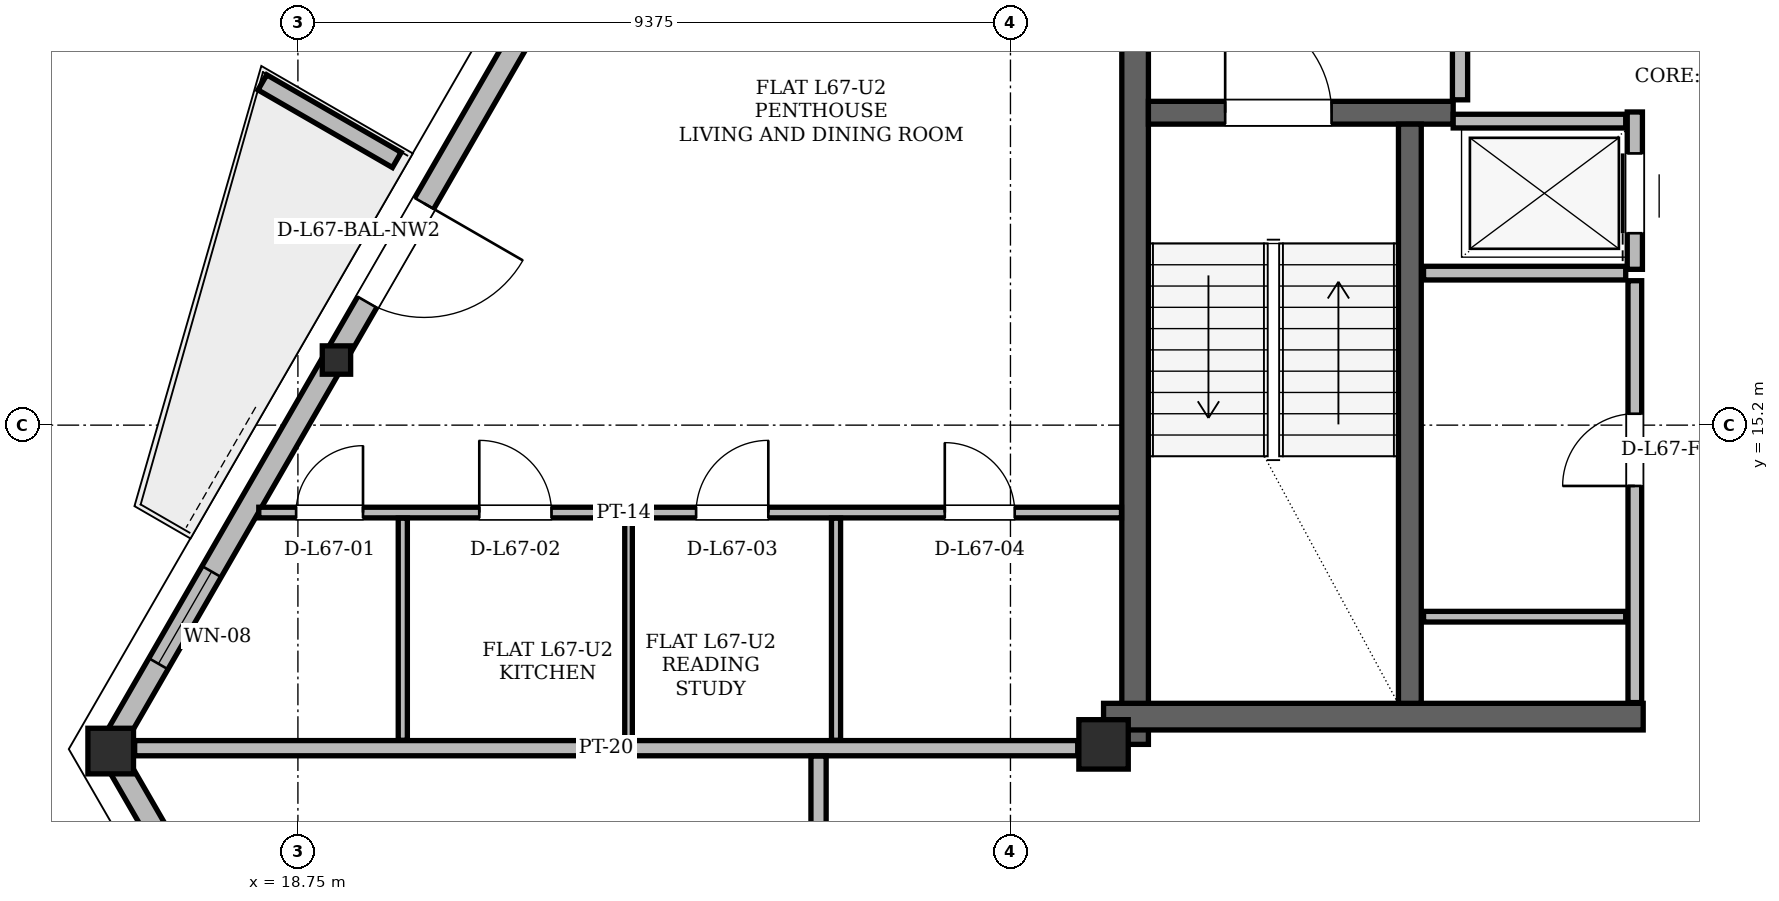
"""IFC4 building model, lengths in metres.
Left out: names, types, materials, properties, quantities, classifications, styles, units other than length and angle.
Written with IfcOpenShell. Run it as: python <this file> out.ifc"""

import sys

from ifc_helpers import new_model, si_unit, direction, frame, frame_2d, origin, origin_2d, place, context, subcontext, project, spatial, polyline, rectangle, hollow_rectangle, i_section, outline, extrude, element, fill, save


model = new_model("IFC4")
c1 = context("Model", 3, precision=1e-05, world=origin(), true_north=direction((0.0, 1.0)))
c2 = subcontext(c1, "Body", "Model", "MODEL_VIEW")
j1 = project(units=[si_unit("LENGTHUNIT", "METRE"), si_unit("PLANEANGLEUNIT", "RADIAN")], contexts=[c1])
p1 = place(None, origin())
s1 = spatial("IfcSite", under=j1, at=p1, CompositionType="ELEMENT")
p2 = place(p1, origin())
s2 = spatial("IfcBuilding", under=s1, at=p2, CompositionType="ELEMENT")
p3 = place(p2, frame((0.0, 0.0, 253.8)))
s3 = spatial("IfcBuildingStorey", under=s2, at=p3, CompositionType="ELEMENT", Elevation=253.8)
p4 = place(p3, frame((29.35, 11.0, 0.0), z_axis=(0.0, 0.0, 1.0), x_axis=(1.0, 0.0, 0.0)))
e1 = element("IfcColumn", 1, at=p4, inside=s3, PredefinedType="COLUMN", context=c2, shape_type="SweptSolid", body=[
    extrude(hollow_rectangle(XDim=0.65, YDim=0.65, WallThickness=0.05, at=origin_2d()), origin(), (0.0, 0.0, 1.0), 3.9),
])
p5 = place(p3, frame((16.267, 10.938, 0.004), z_axis=(0.010476592059, -0.013362359932, 0.999855833786), x_axis=(0.786958941949, 0.617005367632, 0.0)))
e2 = element("IfcColumn", 2, at=p5, inside=s3, PredefinedType="COLUMN", context=c2, shape_type="SweptSolid", body=[
    extrude(hollow_rectangle(XDim=0.6, YDim=0.6, WallThickness=0.045, at=origin_2d()), origin(), (0.0, 0.0, 1.0), 3.892),
])
p6 = place(p3, frame((19.235, 16.079, 0.004), z_axis=(0.011480462652, -0.011605932189, 0.999866741779), x_axis=(0.710939253444, 0.703253423677, 0.0)))
e3 = element("IfcColumn", 3, at=p6, inside=s3, PredefinedType="COLUMN", context=c2, shape_type="SweptSolid", body=[
    extrude(i_section(OverallWidth=0.373, OverallDepth=0.373, WebThickness=0.016, FlangeThickness=0.026, at=origin_2d()), origin(), (0.0, 0.0, 1.0), 3.892),
])
p7 = place(p3, frame((29.765, 11.0, 0.0), z_axis=(0.0, 0.0, 1.0), x_axis=(0.0, 1.0, 0.0)))
e4 = element("IfcWall", 4, at=p7, inside=s3, PredefinedType="SHEAR", context=c2, shape_type="SweptSolid", body=[
    extrude(rectangle(XDim=13.3, YDim=0.35, at=frame_2d((6.65, 0.0))), origin(), (0.0, 0.0, 1.0), 3.68),
])
p8 = place(p3, frame((29.35, 11.365, 0.0), z_axis=(0.0, 0.0, 1.0), x_axis=(1.0, 0.0, 0.0)))
e5 = element("IfcWall", 5, at=p8, inside=s3, PredefinedType="SHEAR", context=c2, shape_type="SweptSolid", body=[
    extrude(rectangle(XDim=7.1, YDim=0.35, at=frame_2d((3.55, 0.0))), origin(), (0.0, 0.0, 1.0), 3.68),
])
p9 = place(p3, frame((29.94, 19.31, 0.0), z_axis=(0.0, 0.0, 1.0), x_axis=(1.0, 0.0, 0.0)))
e6 = element("IfcWall", 6, at=p9, inside=s3, PredefinedType="SHEAR", context=c2, shape_type="SweptSolid", body=[
    extrude(rectangle(XDim=4.01, YDim=0.3, at=frame_2d((2.005, 0.0))), origin(), (0.0, 0.0, 1.0), 3.68),
])
p10 = place(p9, frame((1.01, 0.0, 0.0)))
e7 = element("IfcOpeningElement", 7, at=p10, cuts=e6, PredefinedType="OPENING", context=c2, shape_type="SweptSolid", body=[
    extrude(rectangle(XDim=1.4, YDim=2.2, at=frame_2d((0.7, 1.1))), frame((0.0, 0.15, 0.0), z_axis=(0.0, -1.0, 0.0), x_axis=(1.0, 0.0, 0.0)), (0.0, 0.0, 1.0), 0.3),
])
p11 = place(p3, frame((33.38, 11.54, 0.0), z_axis=(0.0, 0.0, 1.0), x_axis=(0.0, 1.0, 0.0)))
e8 = element("IfcWall", 8, at=p11, inside=s3, PredefinedType="SHEAR", context=c2, shape_type="SweptSolid", body=[
    extrude(rectangle(XDim=7.62, YDim=0.3, at=frame_2d((3.81, 0.0))), origin(), (0.0, 0.0, 1.0), 3.68),
])
p12 = place(p3, frame((16.267, 10.938, 0.0), z_axis=(0.0, 0.0, 1.0), x_axis=(0.500020538415, -0.8660135456, 0.0)))
e9 = element("IfcWall", 9, at=p12, inside=s3, PredefinedType="SOLIDWALL", context=c2, shape_type="SweptSolid", body=[
    extrude(rectangle(XDim=5.365, YDim=0.29, at=frame_2d((2.682, 0.0))), origin(), (0.0, 0.0, 1.0), 3.058),
])
p13 = place(p3, frame((34.818, 43.07, 0.0), z_axis=(0.0, 0.0, 1.0), x_axis=(-0.500001745664, -0.866024395923, 0.0)))
e10 = element("IfcWall", 10, at=p13, inside=s3, PredefinedType="SOLIDWALL", context=c2, shape_type="SweptSolid", body=[
    extrude(rectangle(XDim=37.102, YDim=0.29, at=frame_2d((18.551, 0.0))), origin(), (0.0, 0.0, 1.0), 3.058),
])
p14 = place(p13, frame((8.034, 0.0, 0.0)))
e11 = element("IfcOpeningElement", 11, at=p14, cuts=e10, PredefinedType="OPENING", context=c2, shape_type="SweptSolid", body=[
    extrude(rectangle(XDim=1.5, YDim=2.2, at=frame_2d((0.75, 1.1))), frame((0.0, 0.145, 0.0), z_axis=(0.0, -1.0, 0.0), x_axis=(1.0, 0.0, 0.0)), (0.0, 0.0, 1.0), 0.29),
])
p15 = place(p13, frame((28.813, 0.0, 0.0)))
e12 = element("IfcOpeningElement", 12, at=p15, cuts=e10, PredefinedType="OPENING", context=c2, shape_type="SweptSolid", body=[
    extrude(rectangle(XDim=1.5, YDim=2.2, at=frame_2d((0.75, 1.1))), frame((0.0, 0.145, 0.0), z_axis=(0.0, -1.0, 0.0), x_axis=(1.0, 0.0, 0.0)), (0.0, 0.0, 1.0), 0.29),
])
p16 = place(p13, frame((22.792, 0.0, 0.85)))
e13 = element("IfcOpeningElement", 13, at=p16, cuts=e10, PredefinedType="OPENING", context=c2, shape_type="SweptSolid", body=[
    extrude(rectangle(XDim=1.6, YDim=1.7, at=frame_2d((0.8, 0.85))), frame((0.0, 0.145, 0.0), z_axis=(0.0, -1.0, 0.0), x_axis=(1.0, 0.0, 0.0)), (0.0, 0.0, 1.0), 0.29),
])
p17 = place(p13, frame((34.406, 0.0, 0.85)))
e14 = element("IfcOpeningElement", 14, at=p17, cuts=e10, PredefinedType="OPENING", context=c2, shape_type="SweptSolid", body=[
    extrude(rectangle(XDim=1.4, YDim=1.6, at=frame_2d((0.7, 0.8))), frame((0.0, 0.145, 0.0), z_axis=(0.0, -1.0, 0.0), x_axis=(1.0, 0.0, 0.0)), (0.0, 0.0, 1.0), 0.29),
])
p18 = place(p13, frame((17.801, 0.0, 0.85)))
e15 = element("IfcOpeningElement", 15, at=p18, cuts=e10, PredefinedType="OPENING", context=c2, shape_type="SweptSolid", body=[
    extrude(rectangle(XDim=1.2, YDim=1.48, at=frame_2d((0.6, 0.74))), frame((0.0, 0.145, 0.0), z_axis=(0.0, -1.0, 0.0), x_axis=(1.0, 0.0, 0.0)), (0.0, 0.0, 1.0), 0.29),
])
p19 = place(p13, frame((1.293, 0.0, 0.85)))
e16 = element("IfcOpeningElement", 16, at=p19, cuts=e10, PredefinedType="OPENING", context=c2, shape_type="SweptSolid", body=[
    extrude(rectangle(XDim=1.6, YDim=1.7, at=frame_2d((0.8, 0.85))), frame((0.0, 0.145, 0.0), z_axis=(0.0, -1.0, 0.0), x_axis=(1.0, 0.0, 0.0)), (0.0, 0.0, 1.0), 0.29),
])
p20 = place(p3, frame((20.051, 18.689, 0.0), z_axis=(0.0, 0.0, 1.0), x_axis=(-0.866012356593, 0.500022597718, 0.0)))
e17 = element("IfcWall", 17, at=p20, inside=s3, PredefinedType="PARAPET", context=c2, shape_type="SweptSolid", body=[
    extrude(outline(polyline([(0.0, 0.0), (2.042, 0.0), (2.042, 1.1), (0.0, 1.32), (0.0, 0.0)])), frame((0.0, 0.115, 0.0), z_axis=(0.0, -1.0, 0.0), x_axis=(1.0, 0.0, 0.0)), (0.0, 0.0, 1.0), 0.23),
])
p21 = place(p3, frame((34.04, 19.48, 0.0), z_axis=(0.0, 0.0, 1.0), x_axis=(0.0, 1.0, 0.0)))
e18 = element("IfcWall", 18, at=p21, inside=s3, PredefinedType="PARTITIONING", context=c2, shape_type="SweptSolid", body=[
    extrude(rectangle(XDim=4.5, YDim=0.2, at=frame_2d((2.25, 0.0))), origin(), (0.0, 0.0, 1.0), 3.68),
])
p22 = place(p21, frame((2.12, 0.0, 0.0)))
e19 = element("IfcOpeningElement", 19, at=p22, cuts=e18, PredefinedType="OPENING", context=c2, shape_type="SweptSolid", body=[
    extrude(rectangle(XDim=1.1, YDim=2.2, at=frame_2d((0.55, 1.1))), frame((0.0, 0.1, 0.0), z_axis=(0.0, -1.0, 0.0), x_axis=(1.0, 0.0, 0.0)), (0.0, 0.0, 1.0), 0.2),
])
p23 = place(p3, frame((36.34, 17.25, 0.0), z_axis=(0.0, 0.0, 1.0), x_axis=(0.0, 1.0, 0.0)))
e20 = element("IfcWall", 20, at=p23, inside=s3, PredefinedType="PARTITIONING", context=c2, shape_type="SweptSolid", body=[
    extrude(rectangle(XDim=2.07, YDim=0.2, at=frame_2d((1.035, 0.0))), origin(), (0.0, 0.0, 1.0), 3.68),
])
p24 = place(p23, frame((0.475, 0.0, 0.0)))
e21 = element("IfcOpeningElement", 21, at=p24, cuts=e20, PredefinedType="OPENING", context=c2, shape_type="SweptSolid", body=[
    extrude(rectangle(XDim=1.05, YDim=2.15, at=frame_2d((0.525, 1.075))), frame((0.0, 0.1, 0.0), z_axis=(0.0, -1.0, 0.0), x_axis=(1.0, 0.0, 0.0)), (0.0, 0.0, 1.0), 0.2),
])
p25 = place(p3, frame((33.95, 19.2, 0.0), z_axis=(0.0, 0.0, 1.0), x_axis=(1.0, 0.0, 0.0)))
e22 = element("IfcWall", 22, at=p25, inside=s3, PredefinedType="PARTITIONING", context=c2, shape_type="SweptSolid", body=[
    extrude(rectangle(XDim=2.27, YDim=0.18, at=frame_2d((1.135, 0.0))), origin(), (0.0, 0.0, 1.0), 3.68),
])
p26 = place(p3, frame((33.56, 17.2, 0.0), z_axis=(0.0, 0.0, 1.0), x_axis=(1.0, 0.0, 0.0)))
e23 = element("IfcWall", 23, at=p26, inside=s3, PredefinedType="PARTITIONING", context=c2, shape_type="SweptSolid", body=[
    extrude(rectangle(XDim=2.66, YDim=0.18, at=frame_2d((1.33, 0.0))), origin(), (0.0, 0.0, 1.0), 3.68),
])
p27 = place(p3, frame((36.34, 11.55, 0.0), z_axis=(0.0, 0.0, 1.0), x_axis=(0.0, 1.0, 0.0)))
e24 = element("IfcWall", 24, at=p27, inside=s3, PredefinedType="PARTITIONING", context=c2, shape_type="SweptSolid", body=[
    extrude(rectangle(XDim=5.55, YDim=0.18, at=frame_2d((2.775, 0.0))), origin(), (0.0, 0.0, 1.0), 3.68),
])
p28 = place(p27, frame((2.85, 0.0, 0.0)))
e25 = element("IfcOpeningElement", 25, at=p28, cuts=e24, PredefinedType="OPENING", context=c2, shape_type="SweptSolid", body=[
    extrude(rectangle(XDim=0.95, YDim=2.1, at=frame_2d((0.475, 1.05))), frame((0.0, 0.09, 0.0), z_axis=(0.0, -1.0, 0.0), x_axis=(1.0, 0.0, 0.0)), (0.0, 0.0, 1.0), 0.18),
])
p29 = place(p3, frame((33.56, 12.68, 0.0), z_axis=(0.0, 0.0, 1.0), x_axis=(1.0, 0.0, 0.0)))
e26 = element("IfcWall", 26, at=p29, inside=s3, PredefinedType="PARTITIONING", context=c2, shape_type="SweptSolid", body=[
    extrude(rectangle(XDim=2.66, YDim=0.14, at=frame_2d((1.33, 0.0))), origin(), (0.0, 0.0, 1.0), 3.68),
])
p30 = place(p3, frame((16.602, 10.95, 0.0), z_axis=(0.0, 0.0, 1.0), x_axis=(1.0, 0.0, 0.0)))
e27 = element("IfcWall", 27, at=p30, inside=s3, PredefinedType="PARTITIONING", context=c2, shape_type="SweptSolid", body=[
    extrude(rectangle(XDim=12.408, YDim=0.2, at=frame_2d((6.204, 0.0))), origin(), (0.0, 0.0, 1.0), 3.266),
])
p31 = place(p3, frame((18.235, 14.05, 0.0), z_axis=(0.0, 0.0, 1.0), x_axis=(1.0, 0.0, 0.0)))
e28 = element("IfcWall", 28, at=p31, inside=s3, PredefinedType="PARTITIONING", context=c2, shape_type="SweptSolid", body=[
    extrude(rectangle(XDim=11.351, YDim=0.14, at=frame_2d((5.675, 0.0))), origin(), (0.0, 0.0, 1.0), 2.82),
])
p32 = place(p31, frame((0.491, 0.0, 0.0)))
e29 = element("IfcOpeningElement", 29, at=p32, cuts=e28, PredefinedType="OPENING", context=c2, shape_type="SweptSolid", body=[
    extrude(rectangle(XDim=0.88, YDim=2.08, at=frame_2d((0.44, 1.04))), frame((0.0, 0.07, 0.0), z_axis=(0.0, -1.0, 0.0), x_axis=(1.0, 0.0, 0.0)), (0.0, 0.0, 1.0), 0.14),
])
p33 = place(p31, frame((2.901, 0.0, 0.0)))
e30 = element("IfcOpeningElement", 30, at=p33, cuts=e28, PredefinedType="OPENING", context=c2, shape_type="SweptSolid", body=[
    extrude(rectangle(XDim=0.95, YDim=2.1, at=frame_2d((0.475, 1.05))), frame((0.0, 0.07, 0.0), z_axis=(0.0, -1.0, 0.0), x_axis=(1.0, 0.0, 0.0)), (0.0, 0.0, 1.0), 0.14),
])
p34 = place(p31, frame((5.754, 0.0, 0.0)))
e31 = element("IfcOpeningElement", 31, at=p34, cuts=e28, PredefinedType="OPENING", context=c2, shape_type="SweptSolid", body=[
    extrude(rectangle(XDim=0.95, YDim=2.1, at=frame_2d((0.475, 1.05))), frame((0.0, 0.07, 0.0), z_axis=(0.0, -1.0, 0.0), x_axis=(1.0, 0.0, 0.0)), (0.0, 0.0, 1.0), 0.14),
])
p35 = place(p31, frame((9.026, 0.0, 0.0)))
e32 = element("IfcOpeningElement", 32, at=p35, cuts=e28, PredefinedType="OPENING", context=c2, shape_type="SweptSolid", body=[
    extrude(rectangle(XDim=0.92, YDim=2.12, at=frame_2d((0.46, 1.06))), frame((0.0, 0.07, 0.0), z_axis=(0.0, -1.0, 0.0), x_axis=(1.0, 0.0, 0.0)), (0.0, 0.0, 1.0), 0.14),
])
p36 = place(p3, frame((20.13, 11.054, 0.0), z_axis=(0.0, 0.0, 1.0), x_axis=(0.0, 1.0, 0.0)))
e33 = element("IfcWall", 33, at=p36, inside=s3, PredefinedType="PARTITIONING", context=c2, shape_type="SweptSolid", body=[
    extrude(rectangle(XDim=2.922, YDim=0.12, at=frame_2d((1.461, 0.0))), origin(), (0.0, 0.0, 1.0), 3.68),
])
p37 = place(p3, frame((23.1, 11.054, 0.0), z_axis=(0.0, 0.0, 1.0), x_axis=(0.0, 1.0, 0.0)))
e34 = element("IfcWall", 34, at=p37, inside=s3, PredefinedType="PARTITIONING", context=c2, shape_type="SweptSolid", body=[
    extrude(rectangle(XDim=2.922, YDim=0.1, at=frame_2d((1.461, 0.0))), origin(), (0.0, 0.0, 1.0), 3.68),
])
p38 = place(p3, frame((25.6, 9.404, 0.0), z_axis=(0.0, 0.0, 1.0), x_axis=(0.0, 1.0, 0.0)))
e35 = element("IfcWall", 35, at=p38, inside=s3, PredefinedType="PARTITIONING", context=c2, shape_type="SweptSolid", body=[
    extrude(rectangle(XDim=1.442, YDim=0.2, at=frame_2d((0.721, 0.0))), origin(), (0.0, 0.0, 1.0), 3.68),
])
p39 = place(p3, frame((25.83, 11.054, 0.0), z_axis=(0.0, 0.0, 1.0), x_axis=(0.0, 1.0, 0.0)))
e36 = element("IfcWall", 36, at=p39, inside=s3, PredefinedType="PARTITIONING", context=c2, shape_type="SweptSolid", body=[
    extrude(rectangle(XDim=2.922, YDim=0.12, at=frame_2d((1.461, 0.0))), origin(), (0.0, 0.0, 1.0), 3.68),
])
p40 = place(p15, origin())
e37 = element("IfcDoor", 37, at=p40, inside=s3, OperationType="SINGLE_SWING_LEFT", PredefinedType="DOOR", context=c2, shape_type="SweptSolid", body=[
    extrude(rectangle(XDim=1.5, YDim=2.2, at=frame_2d((0.75, 1.1))), frame((0.0, 0.025, 0.0), z_axis=(0.0, -1.0, 0.0), x_axis=(1.0, 0.0, 0.0)), (0.0, 0.0, 1.0), 0.05),
])
fill(e12, e37)
p41 = place(p17, origin())
e38 = element("IfcWindow", 38, at=p41, inside=s3, PartitioningType="SINGLE_PANEL", PredefinedType="WINDOW", context=c2, shape_type="SweptSolid", body=[
    extrude(rectangle(XDim=1.4, YDim=1.6, at=frame_2d((0.7, 0.8))), frame((0.0, 0.03, 0.0), z_axis=(0.0, -1.0, 0.0), x_axis=(1.0, 0.0, 0.0)), (0.0, 0.0, 1.0), 0.06),
])
fill(e14, e38)
p42 = place(p28, origin())
e39 = element("IfcDoor", 39, at=p42, inside=s3, OperationType="SINGLE_SWING_LEFT", PredefinedType="DOOR", context=c2, shape_type="SweptSolid", body=[
    extrude(rectangle(XDim=0.95, YDim=2.1, at=frame_2d((0.475, 1.05))), frame((0.0, 0.025, 0.0), z_axis=(0.0, -1.0, 0.0), x_axis=(1.0, 0.0, 0.0)), (0.0, 0.0, 1.0), 0.05),
])
fill(e25, e39)
p43 = place(p24, origin())
e40 = element("IfcDoor", 40, at=p43, inside=s3, OperationType="SLIDING_TO_LEFT", PredefinedType="DOOR", context=c2, shape_type="SweptSolid", body=[
    extrude(rectangle(XDim=1.05, YDim=2.15, at=frame_2d((0.525, 1.075))), frame((0.0, 0.025, 0.0), z_axis=(0.0, -1.0, 0.0), x_axis=(1.0, 0.0, 0.0)), (0.0, 0.0, 1.0), 0.05),
])
fill(e21, e40)
p44 = place(p10, origin())
e41 = element("IfcDoor", 41, at=p44, inside=s3, OperationType="SINGLE_SWING_LEFT", PredefinedType="DOOR", context=c2, shape_type="SweptSolid", body=[
    extrude(rectangle(XDim=1.4, YDim=2.2, at=frame_2d((0.7, 1.1))), frame((0.0, 0.025, 0.0), z_axis=(0.0, -1.0, 0.0), x_axis=(1.0, 0.0, 0.0)), (0.0, 0.0, 1.0), 0.05),
])
fill(e7, e41)
p45 = place(p32, origin())
e42 = element("IfcDoor", 42, at=p45, inside=s3, OperationType="SINGLE_SWING_RIGHT", PredefinedType="DOOR", context=c2, shape_type="SweptSolid", body=[
    extrude(rectangle(XDim=0.88, YDim=2.08, at=frame_2d((0.44, 1.04))), frame((0.0, 0.025, 0.0), z_axis=(0.0, -1.0, 0.0), x_axis=(1.0, 0.0, 0.0)), (0.0, 0.0, 1.0), 0.05),
])
fill(e29, e42)
p46 = place(p33, origin())
e43 = element("IfcDoor", 43, at=p46, inside=s3, OperationType="SINGLE_SWING_LEFT", PredefinedType="DOOR", context=c2, shape_type="SweptSolid", body=[
    extrude(rectangle(XDim=0.95, YDim=2.1, at=frame_2d((0.475, 1.05))), frame((0.0, 0.025, 0.0), z_axis=(0.0, -1.0, 0.0), x_axis=(1.0, 0.0, 0.0)), (0.0, 0.0, 1.0), 0.05),
])
fill(e30, e43)
p47 = place(p34, origin())
e44 = element("IfcDoor", 44, at=p47, inside=s3, OperationType="SINGLE_SWING_RIGHT", PredefinedType="DOOR", context=c2, shape_type="SweptSolid", body=[
    extrude(rectangle(XDim=0.95, YDim=2.1, at=frame_2d((0.475, 1.05))), frame((0.0, 0.025, 0.0), z_axis=(0.0, -1.0, 0.0), x_axis=(1.0, 0.0, 0.0)), (0.0, 0.0, 1.0), 0.05),
])
fill(e31, e44)
p48 = place(p35, origin())
e45 = element("IfcDoor", 45, at=p48, inside=s3, OperationType="SINGLE_SWING_LEFT", PredefinedType="DOOR", context=c2, shape_type="SweptSolid", body=[
    extrude(rectangle(XDim=0.92, YDim=2.12, at=frame_2d((0.46, 1.06))), frame((0.0, 0.025, 0.0), z_axis=(0.0, -1.0, 0.0), x_axis=(1.0, 0.0, 0.0)), (0.0, 0.0, 1.0), 0.05),
])
fill(e32, e45)
save(model, sys.argv[1])
